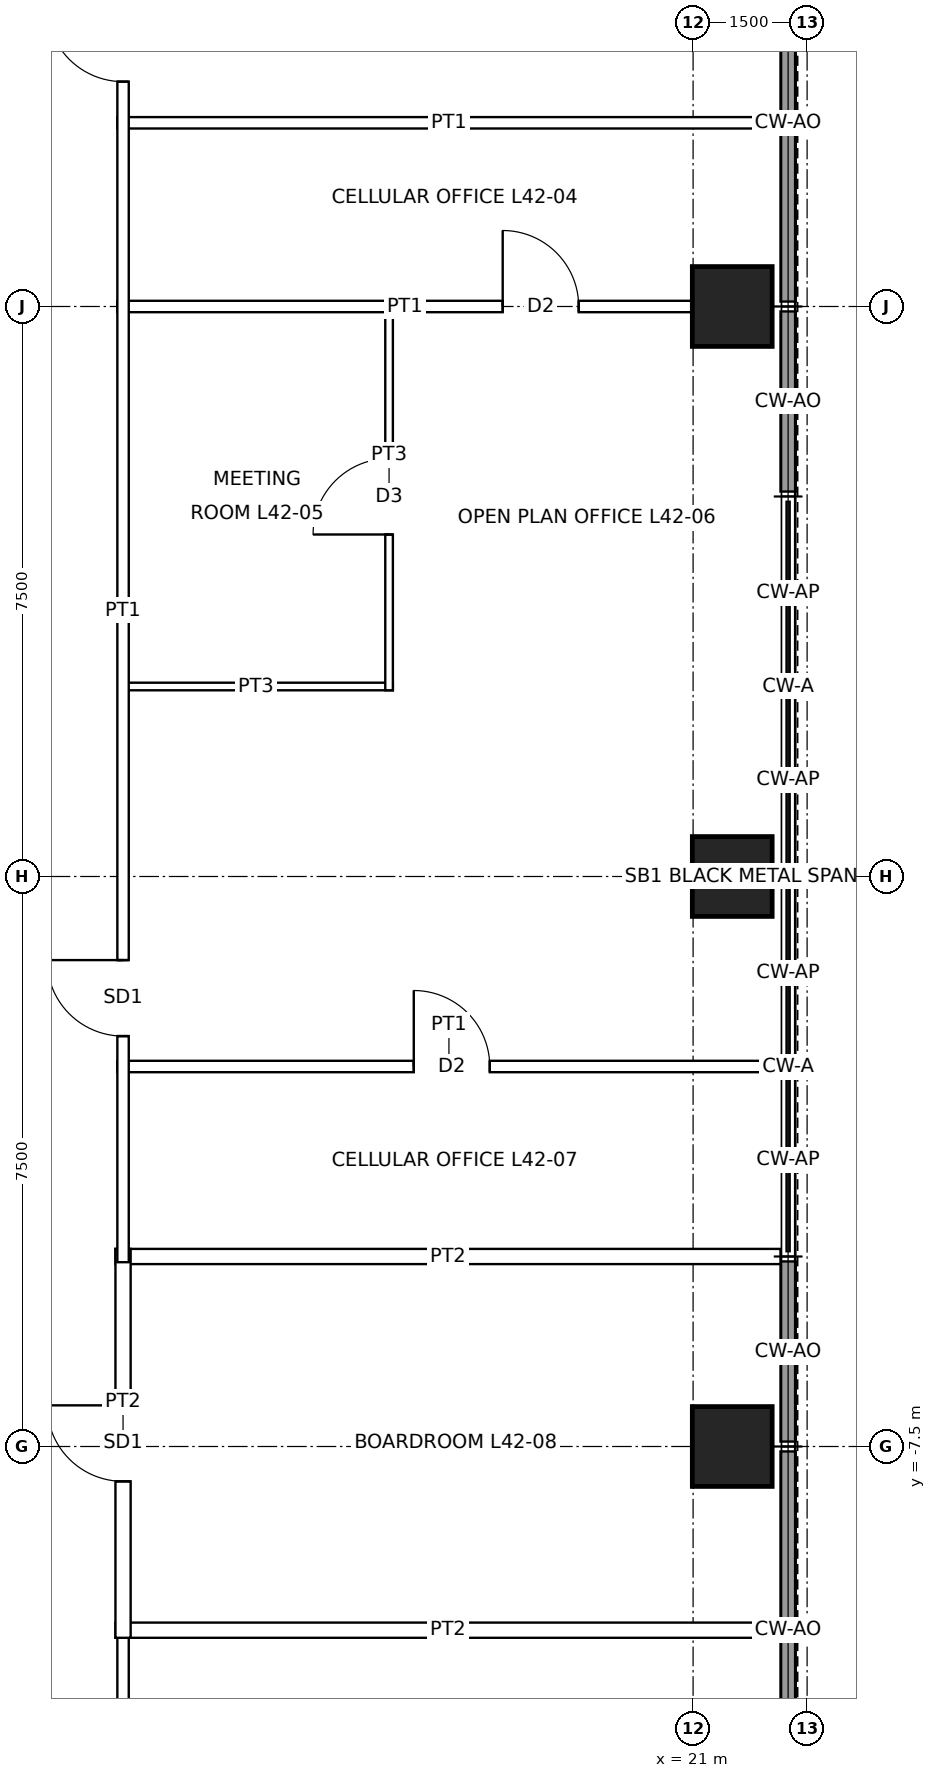
"""IFC4 building model, lengths in metres.
Left out: names, types, materials, properties, quantities, classifications, styles, units other than length and angle.
Written with IfcOpenShell. Run it as: python <this file> out.ifc"""

import sys

from ifc_helpers import new_model, si_unit, direction, frame, frame_2d, origin, origin_2d, place, context, subcontext, project, spatial, rectangle, hollow_rectangle, extrude, element, fill, save


model = new_model("IFC4")
c1 = context("Model", 3, precision=1e-05, world=origin(), true_north=direction((0.0, 1.0)))
c2 = subcontext(c1, "Body", "Model", "MODEL_VIEW")
j1 = project(units=[si_unit("LENGTHUNIT", "METRE"), si_unit("PLANEANGLEUNIT", "RADIAN")], contexts=[c1])
p1 = place(None, origin())
s1 = spatial("IfcSite", under=j1, at=p1, CompositionType="ELEMENT")
p2 = place(p1, origin())
s2 = spatial("IfcBuilding", under=s1, at=p2, CompositionType="ELEMENT")
p3 = place(p2, frame((0.0, 0.0, 201.9)))
s3 = spatial("IfcBuildingStorey", under=s2, at=p3, CompositionType="ELEMENT", Elevation=201.9)
for number, where, z_axis, x_axis in (
    (1, (21.515, 7.5, 0.0), (0.0, 0.0, 1.0), (1.0, 0.0, 0.0)),
    (2, (21.515, 0.0, 0.0), (0.0, 0.0, 1.0), (1.0, 0.0, 0.0)),
    (3, (21.515, -7.5, 0.0), (0.0, 0.0, 1.0), (1.0, 0.0, 0.0)),
):
    element("IfcColumn", number, at=place(p3, frame(where, z_axis=z_axis, x_axis=x_axis)), inside=s3, PredefinedType="COLUMN", context=c2, shape_type="SweptSolid", body=[
        extrude(hollow_rectangle(XDim=1.05, YDim=1.05, WallThickness=0.07, at=origin_2d()), origin(), (0.0, 0.0, 1.0), 4.0),
    ])
for number, where, z_axis, x_axis in (
    (4, (22.25, 12.268, 0.0), (0.0, 0.0, 1.0), (0.0, -1.0, 0.0)),
    (5, (22.25, 9.884, 0.0), (0.0, 0.0, 1.0), (0.0, -1.0, 0.0)),
):
    element("IfcWall", number, at=place(p3, frame(where, z_axis=z_axis, x_axis=x_axis)), inside=s3, PredefinedType="SOLIDWALL", context=c2, shape_type="SweptSolid", body=[
        extrude(rectangle(XDim=2.319, YDim=0.2, at=frame_2d((1.16, 0.0))), origin(), (0.0, 0.0, 1.0), 3.85),
    ])
for number, where, z_axis, x_axis in (
    (6, (22.25, 7.435, 0.0), (0.0, 0.0, 1.0), (0.0, -1.0, 0.0)),
    (7, (22.25, -5.065, 0.0), (0.0, 0.0, 1.0), (0.0, -1.0, 0.0)),
):
    element("IfcWall", number, at=place(p3, frame(where, z_axis=z_axis, x_axis=x_axis)), inside=s3, PredefinedType="SOLIDWALL", context=c2, shape_type="SweptSolid", body=[
        extrude(rectangle(XDim=2.37, YDim=0.2, at=frame_2d((1.185, 0.0))), origin(), (0.0, 0.0, 1.0), 3.85),
    ])
for number, where, z_axis, x_axis in (
    (8, (22.25, -7.565, 0.0), (0.0, 0.0, 1.0), (0.0, -1.0, 0.0)),
    (9, (22.25, -9.949, 0.0), (0.0, 0.0, 1.0), (0.0, -1.0, 0.0)),
):
    element("IfcWall", number, at=place(p3, frame(where, z_axis=z_axis, x_axis=x_axis)), inside=s3, PredefinedType="SOLIDWALL", context=c2, shape_type="SweptSolid", body=[
        extrude(rectangle(XDim=2.319, YDim=0.2, at=frame_2d((1.16, 0.0))), origin(), (0.0, 0.0, 1.0), 3.85),
    ])
for number, where, z_axis, x_axis in (
    (10, (13.4, -9.917, 0.0), (0.0, 0.0, 1.0), (1.0, 0.0, 0.0)),
    (11, (13.4, -5.0, 0.0), (0.0, 0.0, 1.0), (1.0, 0.0, 0.0)),
):
    element("IfcWall", number, at=place(p3, frame(where, z_axis=z_axis, x_axis=x_axis)), inside=s3, PredefinedType="PARTITIONING", context=c2, shape_type="SweptSolid", body=[
        extrude(rectangle(XDim=8.75, YDim=0.2, at=frame_2d((4.375, 0.0))), origin(), (0.0, 0.0, 1.0), 3.85),
    ])
p4 = place(p3, frame((13.425, -2.5, 0.0), z_axis=(0.0, 0.0, 1.0), x_axis=(1.0, 0.0, 0.0)))
e12 = element("IfcWall", 12, at=p4, inside=s3, PredefinedType="PARTITIONING", context=c2, shape_type="SweptSolid", body=[
    extrude(rectangle(XDim=8.725, YDim=0.15, at=frame_2d((4.362, 0.0))), origin(), (0.0, 0.0, 1.0), 3.85),
])
p5 = place(p4, frame((3.9, 0.0, 0.0)))
e13 = element("IfcOpeningElement", 13, at=p5, cuts=e12, PredefinedType="OPENING", context=c2, shape_type="SweptSolid", body=[
    extrude(rectangle(XDim=1.0, YDim=2.1, at=frame_2d((0.5, 1.05))), frame((0.0, 0.085, 0.0), z_axis=(0.0, -1.0, 0.0), x_axis=(1.0, 0.0, 0.0)), (0.0, 0.0, 1.0), 0.17),
])
p6 = place(p3, frame((13.45, 2.5, 0.0), z_axis=(0.0, 0.0, 1.0), x_axis=(1.0, 0.0, 0.0)))
e14 = element("IfcWall", 14, at=p6, inside=s3, PredefinedType="PARTITIONING", context=c2, shape_type="SweptSolid", body=[
    extrude(rectangle(XDim=3.6, YDim=0.1, at=frame_2d((1.8, 0.0))), origin(), (0.0, 0.0, 1.0), 3.85),
])
p7 = place(p3, frame((13.425, 7.5, 0.0), z_axis=(0.0, 0.0, 1.0), x_axis=(1.0, 0.0, 0.0)))
e15 = element("IfcWall", 15, at=p7, inside=s3, PredefinedType="PARTITIONING", context=c2, shape_type="SweptSolid", body=[
    extrude(rectangle(XDim=7.565, YDim=0.15, at=frame_2d((3.782, 0.0))), origin(), (0.0, 0.0, 1.0), 3.238),
])
p8 = place(p7, frame((5.07, 0.0, 0.0)))
e16 = element("IfcOpeningElement", 16, at=p8, cuts=e15, PredefinedType="OPENING", context=c2, shape_type="SweptSolid", body=[
    extrude(rectangle(XDim=1.0, YDim=2.1, at=frame_2d((0.5, 1.05))), frame((0.0, 0.085, 0.0), z_axis=(0.0, -1.0, 0.0), x_axis=(1.0, 0.0, 0.0)), (0.0, 0.0, 1.0), 0.17),
])
p9 = place(p3, frame((13.425, 9.917, 0.0), z_axis=(0.0, 0.0, 1.0), x_axis=(1.0, 0.0, 0.0)))
e17 = element("IfcWall", 17, at=p9, inside=s3, PredefinedType="PARTITIONING", context=c2, shape_type="SweptSolid", body=[
    extrude(rectangle(XDim=8.725, YDim=0.15, at=frame_2d((4.362, 0.0))), origin(), (0.0, 0.0, 1.0), 3.85),
])
p10 = place(p3, frame((13.5, -13.575, 0.0), z_axis=(0.0, 0.0, 1.0), x_axis=(0.0, 1.0, 0.0)))
e18 = element("IfcWall", 18, at=p10, inside=s3, PredefinedType="PARTITIONING", context=c2, shape_type="SweptSolid", body=[
    extrude(rectangle(XDim=3.733, YDim=0.15, at=frame_2d((1.866, 0.0))), origin(), (0.0, 0.0, 1.0), 3.85),
])
p11 = place(p3, frame((13.5, -10.017, 0.0), z_axis=(0.0, 0.0, 1.0), x_axis=(0.0, 1.0, 0.0)))
e19 = element("IfcWall", 19, at=p11, inside=s3, PredefinedType="PARTITIONING", context=c2, shape_type="SweptSolid", body=[
    extrude(rectangle(XDim=5.117, YDim=0.2, at=frame_2d((2.559, 0.0))), origin(), (0.0, 0.0, 1.0), 3.85),
])
p12 = place(p11, frame((2.059, 0.0, 0.0)))
e20 = element("IfcOpeningElement", 20, at=p12, cuts=e19, PredefinedType="OPENING", context=c2, shape_type="SweptSolid", body=[
    extrude(rectangle(XDim=1.0, YDim=2.4, at=frame_2d((0.5, 1.2))), frame((0.0, 0.11, 0.0), z_axis=(0.0, -1.0, 0.0), x_axis=(1.0, 0.0, 0.0)), (0.0, 0.0, 1.0), 0.22),
])
p13 = place(p3, frame((13.5, -5.075, 0.0), z_axis=(0.0, 0.0, 1.0), x_axis=(0.0, 1.0, 0.0)))
e21 = element("IfcWall", 21, at=p13, inside=s3, PredefinedType="PARTITIONING", context=c2, shape_type="SweptSolid", body=[
    extrude(rectangle(XDim=17.15, YDim=0.15, at=frame_2d((8.575, 0.0))), origin(), (0.0, 0.0, 1.0), 3.85),
])
p14 = place(p13, frame((2.975, 0.0, 0.0)))
e22 = element("IfcOpeningElement", 22, at=p14, cuts=e21, PredefinedType="OPENING", context=c2, shape_type="SweptSolid", body=[
    extrude(rectangle(XDim=1.0, YDim=2.4, at=frame_2d((0.5, 1.2))), frame((0.0, 0.085, 0.0), z_axis=(0.0, -1.0, 0.0), x_axis=(1.0, 0.0, 0.0)), (0.0, 0.0, 1.0), 0.17),
])
p15 = place(p13, frame((15.533, 0.0, 0.0)))
e23 = element("IfcOpeningElement", 23, at=p15, cuts=e21, PredefinedType="OPENING", context=c2, shape_type="SweptSolid", body=[
    extrude(rectangle(XDim=1.0, YDim=2.4, at=frame_2d((0.5, 1.2))), frame((0.0, 0.085, 0.0), z_axis=(0.0, -1.0, 0.0), x_axis=(1.0, 0.0, 0.0)), (0.0, 0.0, 1.0), 0.17),
])
p16 = place(p3, frame((17.0, 2.45, 0.0), z_axis=(0.0, 0.0, 1.0), x_axis=(0.0, 1.0, 0.0)))
e24 = element("IfcWall", 24, at=p16, inside=s3, PredefinedType="PARTITIONING", context=c2, shape_type="SweptSolid", body=[
    extrude(rectangle(XDim=5.1, YDim=0.1, at=frame_2d((2.55, 0.0))), origin(), (0.0, 0.0, 1.0), 3.85),
])
p17 = place(p16, frame((2.05, 0.0, 0.0)))
e25 = element("IfcOpeningElement", 25, at=p17, cuts=e24, PredefinedType="OPENING", context=c2, shape_type="SweptSolid", body=[
    extrude(rectangle(XDim=1.0, YDim=2.1, at=frame_2d((0.5, 1.05))), frame((0.0, 0.06, 0.0), z_axis=(0.0, -1.0, 0.0), x_axis=(1.0, 0.0, 0.0)), (0.0, 0.0, 1.0), 0.12),
])
p18 = place(p8, origin())
e26 = element("IfcDoor", 26, at=p18, inside=s3, OperationType="SINGLE_SWING_LEFT", PredefinedType="DOOR", context=c2, shape_type="SweptSolid", body=[
    extrude(rectangle(XDim=1.0, YDim=2.1, at=frame_2d((0.5, 1.05))), frame((0.0, 0.025, 0.0), z_axis=(0.0, -1.0, 0.0), x_axis=(1.0, 0.0, 0.0)), (0.0, 0.0, 1.0), 0.05),
])
fill(e16, e26)
p19 = place(p17, origin())
e27 = element("IfcDoor", 27, at=p19, inside=s3, OperationType="SINGLE_SWING_LEFT", PredefinedType="DOOR", context=c2, shape_type="SweptSolid", body=[
    extrude(rectangle(XDim=1.0, YDim=2.1, at=frame_2d((0.5, 1.05))), frame((0.0, 0.025, 0.0), z_axis=(0.0, -1.0, 0.0), x_axis=(1.0, 0.0, 0.0)), (0.0, 0.0, 1.0), 0.05),
])
fill(e25, e27)
p20 = place(p14, origin())
e28 = element("IfcDoor", 28, at=p20, inside=s3, OperationType="SINGLE_SWING_RIGHT", PredefinedType="DOOR", context=c2, shape_type="SweptSolid", body=[
    extrude(rectangle(XDim=1.0, YDim=2.4, at=frame_2d((0.5, 1.2))), frame((0.0, 0.025, 0.0), z_axis=(0.0, -1.0, 0.0), x_axis=(1.0, 0.0, 0.0)), (0.0, 0.0, 1.0), 0.05),
])
fill(e22, e28)
p21 = place(p5, origin())
e29 = element("IfcDoor", 29, at=p21, inside=s3, OperationType="SINGLE_SWING_LEFT", PredefinedType="DOOR", context=c2, shape_type="SweptSolid", body=[
    extrude(rectangle(XDim=1.0, YDim=2.1, at=frame_2d((0.5, 1.05))), frame((0.0, 0.025, 0.0), z_axis=(0.0, -1.0, 0.0), x_axis=(1.0, 0.0, 0.0)), (0.0, 0.0, 1.0), 0.05),
])
fill(e13, e29)
p22 = place(p12, origin())
e30 = element("IfcDoor", 30, at=p22, inside=s3, OperationType="SINGLE_SWING_RIGHT", PredefinedType="DOOR", context=c2, shape_type="SweptSolid", body=[
    extrude(rectangle(XDim=1.0, YDim=2.4, at=frame_2d((0.5, 1.2))), frame((0.0, 0.025, 0.0), z_axis=(0.0, -1.0, 0.0), x_axis=(1.0, 0.0, 0.0)), (0.0, 0.0, 1.0), 0.05),
])
fill(e20, e30)
p23 = place(p15, origin())
e31 = element("IfcDoor", 31, at=p23, inside=s3, OperationType="SINGLE_SWING_RIGHT", PredefinedType="DOOR", context=c2, shape_type="SweptSolid", body=[
    extrude(rectangle(XDim=1.0, YDim=2.4, at=frame_2d((0.5, 1.2))), frame((0.0, 0.025, 0.0), z_axis=(0.0, -1.0, 0.0), x_axis=(1.0, 0.0, 0.0)), (0.0, 0.0, 1.0), 0.05),
])
fill(e23, e31)
save(model, sys.argv[1])
